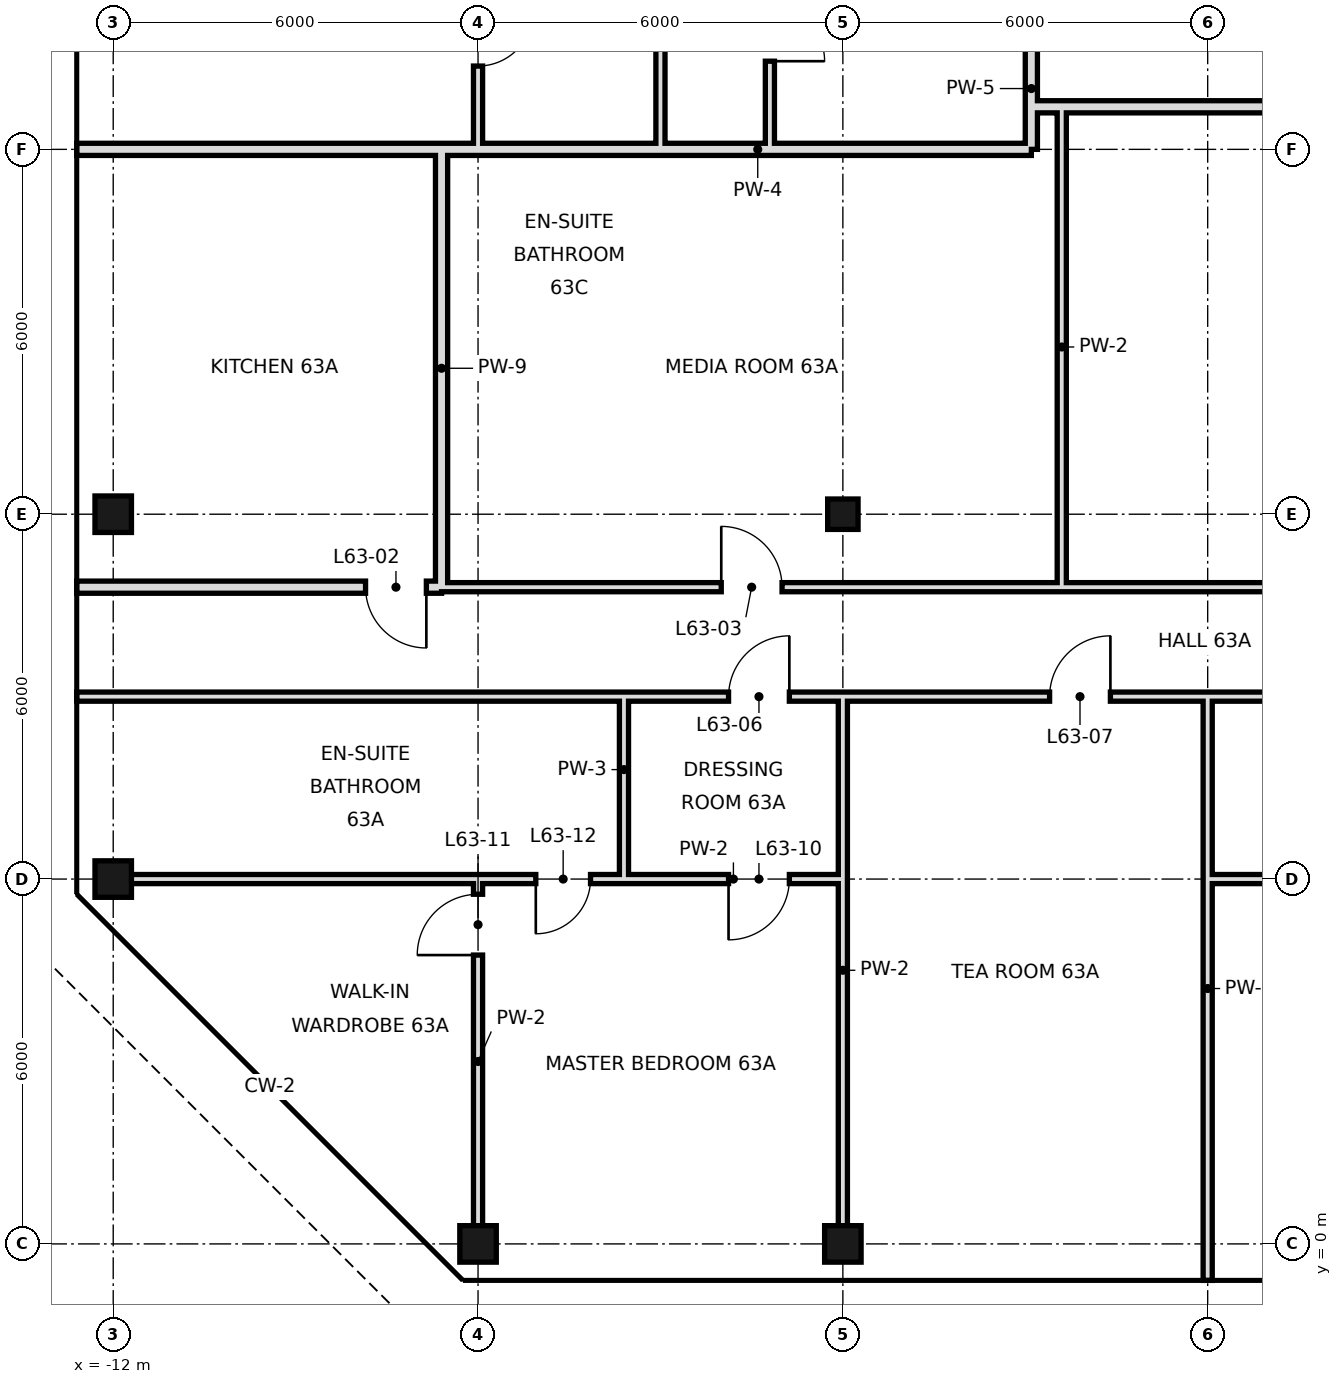
"""IFC4 building model, lengths in metres.
Left out: names, types, materials, properties, quantities, classifications, styles, units other than length and angle.
Written with IfcOpenShell. Run it as: python <this file> out.ifc"""

import sys

from ifc_helpers import new_model, si_unit, direction, frame, frame_2d, origin, origin_2d, place, context, subcontext, project, spatial, rectangle, hollow_rectangle, extrude, element, fill, save


model = new_model("IFC4")
c1 = context("Model", 3, precision=1e-05, world=origin(), true_north=direction((0.0, 1.0)))
c2 = subcontext(c1, "Body", "Model", "MODEL_VIEW")
j1 = project(units=[si_unit("LENGTHUNIT", "METRE"), si_unit("PLANEANGLEUNIT", "RADIAN")], contexts=[c1])
p1 = place(None, origin())
s1 = spatial("IfcSite", under=j1, at=p1, CompositionType="ELEMENT")
p2 = place(p1, origin())
s2 = spatial("IfcBuilding", under=s1, at=p2, CompositionType="ELEMENT")
p3 = place(p2, frame((0.0, 0.0, 266.6)))
s3 = spatial("IfcBuildingStorey", under=s2, at=p3, CompositionType="ELEMENT", Elevation=266.6)
for number, where, z_axis, x_axis in (
    (1, (-12.0, 6.0, 0.0), (0.0, 0.0, 1.0), (1.0, 0.0, 0.0)),
    (2, (-12.0, 12.0, 0.0), (0.0, 0.0, 1.0), (1.0, 0.0, 0.0)),
    (3, (-6.0, 0.0, 0.0), (0.0, 0.0, 1.0), (1.0, 0.0, 0.0)),
    (4, (0.0, 0.0, 0.0), (0.0, 0.0, 1.0), (1.0, 0.0, 0.0)),
):
    element("IfcColumn", number, at=place(p3, frame(where, z_axis=z_axis, x_axis=x_axis)), inside=s3, PredefinedType="COLUMN", context=c2, shape_type="SweptSolid", body=[
        extrude(hollow_rectangle(XDim=0.6, YDim=0.6, WallThickness=0.028, at=origin_2d()), origin(), (0.0, 0.0, 1.0), 3.6),
    ])
p4 = place(p3, frame((0.0, 12.0, 0.0), z_axis=(0.0, 0.0, 1.0), x_axis=(1.0, 0.0, 0.0)))
e5 = element("IfcColumn", 5, at=p4, inside=s3, PredefinedType="COLUMN", context=c2, shape_type="SweptSolid", body=[
    extrude(hollow_rectangle(XDim=0.5, YDim=0.5, WallThickness=0.025, at=origin_2d()), origin(), (0.0, 0.0, 1.0), 3.6),
])
p5 = place(p3, frame((-1.2, 18.0, 0.0), z_axis=(0.0, 0.0, 1.0), x_axis=(0.0, 1.0, 0.0)))
e6 = element("IfcWall", 6, at=p5, inside=s3, PredefinedType="PARTITIONING", context=c2, shape_type="SweptSolid", body=[
    extrude(rectangle(XDim=22.2, YDim=0.15, at=frame_2d((11.1, 0.0))), origin(), (0.0, 0.0, 1.0), 3.42),
])
p6 = place(p5, frame((6.64, 0.0, 0.0)))
e7 = element("IfcOpeningElement", 7, at=p6, cuts=e6, PredefinedType="OPENING", context=c2, shape_type="SweptSolid", body=[
    extrude(rectangle(XDim=1.0, YDim=2.4, at=frame_2d((0.5, 1.2))), frame((0.0, 0.085, 0.0), z_axis=(0.0, -1.0, 0.0), x_axis=(1.0, 0.0, 0.0)), (0.0, 0.0, 1.0), 0.17),
])
p7 = place(p5, frame((1.45, 0.0, 0.0)))
e8 = element("IfcOpeningElement", 8, at=p7, cuts=e6, PredefinedType="OPENING", context=c2, shape_type="SweptSolid", body=[
    extrude(rectangle(XDim=0.9, YDim=2.1, at=frame_2d((0.45, 1.05))), frame((0.0, 0.085, 0.0), z_axis=(0.0, -1.0, 0.0), x_axis=(1.0, 0.0, 0.0)), (0.0, 0.0, 1.0), 0.17),
])
p8 = place(p5, frame((15.7, 0.0, 0.0)))
e9 = element("IfcOpeningElement", 9, at=p8, cuts=e6, PredefinedType="OPENING", context=c2, shape_type="SweptSolid", body=[
    extrude(rectangle(XDim=1.0, YDim=2.4, at=frame_2d((0.5, 1.2))), frame((0.0, 0.085, 0.0), z_axis=(0.0, -1.0, 0.0), x_axis=(1.0, 0.0, 0.0)), (0.0, 0.0, 1.0), 0.17),
])
for number, where, z_axis, x_axis in (
    (10, (-3.0, 18.0, 0.0), (0.0, 0.0, 1.0), (0.0, 1.0, 0.0)),
    (11, (-3.6, 6.0, 0.0), (0.0, 0.0, 1.0), (0.0, 1.0, 0.0)),
):
    element("IfcWall", number, at=place(p3, frame(where, z_axis=z_axis, x_axis=x_axis)), inside=s3, PredefinedType="PARTITIONING", context=c2, shape_type="SweptSolid", body=[
        extrude(rectangle(XDim=3.0, YDim=0.15, at=frame_2d((1.5, 0.0))), origin(), (0.0, 0.0, 1.0), 3.42),
    ])
p9 = place(p3, frame((-6.0, 0.0, 0.0), z_axis=(0.0, 0.0, 1.0), x_axis=(0.0, 1.0, 0.0)))
e12 = element("IfcWall", 12, at=p9, inside=s3, PredefinedType="PARTITIONING", context=c2, shape_type="SweptSolid", body=[
    extrude(rectangle(XDim=6.0, YDim=0.15, at=frame_2d((3.0, 0.0))), origin(), (0.0, 0.0, 1.0), 3.42),
])
p10 = place(p9, frame((4.75, 0.0, 0.0)))
e13 = element("IfcOpeningElement", 13, at=p10, cuts=e12, PredefinedType="OPENING", context=c2, shape_type="SweptSolid", body=[
    extrude(rectangle(XDim=1.0, YDim=2.4, at=frame_2d((0.5, 1.2))), frame((0.0, 0.085, 0.0), z_axis=(0.0, -1.0, 0.0), x_axis=(1.0, 0.0, 0.0)), (0.0, 0.0, 1.0), 0.17),
])
p11 = place(p3, frame((-6.0, 18.0, 0.0), z_axis=(0.0, 0.0, 1.0), x_axis=(0.0, 1.0, 0.0)))
e14 = element("IfcWall", 14, at=p11, inside=s3, PredefinedType="PARTITIONING", context=c2, shape_type="SweptSolid", body=[
    extrude(rectangle(XDim=3.0, YDim=0.15, at=frame_2d((1.5, 0.0))), origin(), (0.0, 0.0, 1.0), 3.42),
])
p12 = place(p11, frame((1.37, 0.0, 0.0)))
e15 = element("IfcOpeningElement", 15, at=p12, cuts=e14, PredefinedType="OPENING", context=c2, shape_type="SweptSolid", body=[
    extrude(rectangle(XDim=0.9, YDim=2.4, at=frame_2d((0.45, 1.2))), frame((0.0, 0.085, 0.0), z_axis=(0.0, -1.0, 0.0), x_axis=(1.0, 0.0, 0.0)), (0.0, 0.0, 1.0), 0.17),
])
p13 = place(p3, frame((-6.6, 10.8, 0.0), z_axis=(0.0, 0.0, 1.0), x_axis=(0.0, 1.0, 0.0)))
e16 = element("IfcWall", 16, at=p13, inside=s3, PredefinedType="SOLIDWALL", context=c2, shape_type="SweptSolid", body=[
    extrude(rectangle(XDim=7.2, YDim=0.2, at=frame_2d((3.6, 0.0))), origin(), (0.0, 0.0, 1.0), 2.72),
])
p14 = place(p3, frame((0.0, 0.0, 0.0), z_axis=(0.0, 0.0, 1.0), x_axis=(0.0, 1.0, 0.0)))
e17 = element("IfcWall", 17, at=p14, inside=s3, PredefinedType="PARTITIONING", context=c2, shape_type="SweptSolid", body=[
    extrude(rectangle(XDim=9.0, YDim=0.15, at=frame_2d((4.5, 0.0))), origin(), (0.0, 0.0, 1.0), 2.72),
])
p15 = place(p3, frame((3.1, 18.7, 0.0), z_axis=(0.0, 0.0, 1.0), x_axis=(0.0, 1.0, 0.0)))
e18 = element("IfcWall", 18, at=p15, inside=s3, PredefinedType="SOLIDWALL", context=c2, shape_type="SweptSolid", body=[
    extrude(rectangle(XDim=21.5, YDim=0.2, at=frame_2d((10.75, 0.0))), origin(), (0.0, 0.0, 1.0), 2.97),
])
p16 = place(p15, frame((6.5, 0.0, 0.0)))
e19 = element("IfcOpeningElement", 19, at=p16, cuts=e18, PredefinedType="OPENING", context=c2, shape_type="SweptSolid", body=[
    extrude(rectangle(XDim=1.2, YDim=2.4, at=frame_2d((0.6, 1.2))), frame((0.0, 0.11, 0.0), z_axis=(0.0, -1.0, 0.0), x_axis=(1.0, 0.0, 0.0)), (0.0, 0.0, 1.0), 0.22),
])
p17 = place(p3, frame((3.1, 18.0, 0.0), z_axis=(0.0, 0.0, 1.0), x_axis=(0.0, 1.0, 0.0)))
e20 = element("IfcWall", 20, at=p17, inside=s3, PredefinedType="SOLIDWALL", context=c2, shape_type="SweptSolid", body=[
    extrude(rectangle(XDim=0.7, YDim=0.2, at=frame_2d((0.35, 0.0))), origin(), (0.0, 0.0, 1.0), 2.97),
])
p18 = place(p3, frame((3.6, 10.8, 0.0), z_axis=(0.0, 0.0, 1.0), x_axis=(0.0, 1.0, 0.0)))
e21 = element("IfcWall", 21, at=p18, inside=s3, PredefinedType="PARTITIONING", context=c2, shape_type="SweptSolid", body=[
    extrude(rectangle(XDim=7.9, YDim=0.15, at=frame_2d((3.95, 0.0))), origin(), (0.0, 0.0, 1.0), 3.42),
])
p19 = place(p3, frame((6.0, -0.6, 0.0), z_axis=(0.0, 0.0, 1.0), x_axis=(0.0, 1.0, 0.0)))
e22 = element("IfcWall", 22, at=p19, inside=s3, PredefinedType="PARTITIONING", context=c2, shape_type="SweptSolid", body=[
    extrude(rectangle(XDim=9.6, YDim=0.15, at=frame_2d((4.8, 0.0))), origin(), (0.0, 0.0, 1.0), 2.72),
])
p20 = place(p3, frame((-12.6, 10.8, 0.0), z_axis=(0.0, 0.0, 1.0), x_axis=(1.0, 0.0, 0.0)))
e23 = element("IfcWall", 23, at=p20, inside=s3, PredefinedType="SOLIDWALL", context=c2, shape_type="SweptSolid", body=[
    extrude(rectangle(XDim=6.0, YDim=0.2, at=frame_2d((3.0, 0.0))), origin(), (0.0, 0.0, 1.0), 2.97),
])
p21 = place(p20, frame((4.75, 0.0, 0.0)))
e24 = element("IfcOpeningElement", 24, at=p21, cuts=e23, PredefinedType="OPENING", context=c2, shape_type="SweptSolid", body=[
    extrude(rectangle(XDim=1.0, YDim=2.4, at=frame_2d((0.5, 1.2))), frame((0.0, 0.11, 0.0), z_axis=(0.0, -1.0, 0.0), x_axis=(1.0, 0.0, 0.0)), (0.0, 0.0, 1.0), 0.22),
])
p22 = place(p3, frame((-6.6, 10.8, 0.0), z_axis=(0.0, 0.0, 1.0), x_axis=(1.0, 0.0, 0.0)))
e25 = element("IfcWall", 25, at=p22, inside=s3, PredefinedType="PARTITIONING", context=c2, shape_type="SweptSolid", body=[
    extrude(rectangle(XDim=28.2, YDim=0.15, at=frame_2d((14.1, 0.0))), origin(), (0.0, 0.0, 1.0), 3.42),
])
p23 = place(p22, frame((25.6, 0.0, 0.0)))
e26 = element("IfcOpeningElement", 26, at=p23, cuts=e25, PredefinedType="OPENING", context=c2, shape_type="SweptSolid", body=[
    extrude(rectangle(XDim=1.0, YDim=2.4, at=frame_2d((0.5, 1.2))), frame((0.0, 0.085, 0.0), z_axis=(0.0, -1.0, 0.0), x_axis=(1.0, 0.0, 0.0)), (0.0, 0.0, 1.0), 0.17),
])
p24 = place(p22, frame((4.6, 0.0, 0.0)))
e27 = element("IfcOpeningElement", 27, at=p24, cuts=e25, PredefinedType="OPENING", context=c2, shape_type="SweptSolid", body=[
    extrude(rectangle(XDim=1.0, YDim=2.4, at=frame_2d((0.5, 1.2))), frame((0.0, 0.085, 0.0), z_axis=(0.0, -1.0, 0.0), x_axis=(1.0, 0.0, 0.0)), (0.0, 0.0, 1.0), 0.17),
])
p25 = place(p22, frame((15.7, 0.0, 0.0)))
e28 = element("IfcOpeningElement", 28, at=p25, cuts=e25, PredefinedType="OPENING", context=c2, shape_type="SweptSolid", body=[
    extrude(rectangle(XDim=1.0, YDim=2.4, at=frame_2d((0.5, 1.2))), frame((0.0, 0.085, 0.0), z_axis=(0.0, -1.0, 0.0), x_axis=(1.0, 0.0, 0.0)), (0.0, 0.0, 1.0), 0.17),
])
p26 = place(p3, frame((-12.6, 18.0, 0.0), z_axis=(0.0, 0.0, 1.0), x_axis=(1.0, 0.0, 0.0)))
e29 = element("IfcWall", 29, at=p26, inside=s3, PredefinedType="SOLIDWALL", context=c2, shape_type="SweptSolid", body=[
    extrude(rectangle(XDim=6.0, YDim=0.2, at=frame_2d((3.0, 0.0))), origin(), (0.0, 0.0, 1.0), 2.72),
])
p27 = place(p3, frame((-6.6, 18.0, 0.0), z_axis=(0.0, 0.0, 1.0), x_axis=(1.0, 0.0, 0.0)))
e30 = element("IfcWall", 30, at=p27, inside=s3, PredefinedType="SOLIDWALL", context=c2, shape_type="SweptSolid", body=[
    extrude(rectangle(XDim=9.7, YDim=0.2, at=frame_2d((4.85, 0.0))), origin(), (0.0, 0.0, 1.0), 2.72),
])
p28 = place(p3, frame((3.1, 18.7, 0.0), z_axis=(0.0, 0.0, 1.0), x_axis=(1.0, 0.0, 0.0)))
e31 = element("IfcWall", 31, at=p28, inside=s3, PredefinedType="SOLIDWALL", context=c2, shape_type="SweptSolid", body=[
    extrude(rectangle(XDim=20.9, YDim=0.2, at=frame_2d((10.45, 0.0))), origin(), (0.0, 0.0, 1.0), 2.72),
])
p29 = place(p28, frame((14.9, 0.0, 0.0)))
e32 = element("IfcOpeningElement", 32, at=p29, cuts=e31, PredefinedType="OPENING", context=c2, shape_type="SweptSolid", body=[
    extrude(rectangle(XDim=1.2, YDim=2.4, at=frame_2d((0.6, 1.2))), frame((0.0, 0.11, 0.0), z_axis=(0.0, -1.0, 0.0), x_axis=(1.0, 0.0, 0.0)), (0.0, 0.0, 1.0), 0.22),
])
p30 = place(p3, frame((-3.6, 6.0, 0.0), z_axis=(0.0, 0.0, 1.0), x_axis=(1.0, 0.0, 0.0)))
e33 = element("IfcWall", 33, at=p30, inside=s3, PredefinedType="PARTITIONING", context=c2, shape_type="SweptSolid", body=[
    extrude(rectangle(XDim=3.6, YDim=0.15, at=frame_2d((1.8, 0.0))), origin(), (0.0, 0.0, 1.0), 2.72),
])
p31 = place(p30, frame((1.72, 0.0, 0.0)))
e34 = element("IfcOpeningElement", 34, at=p31, cuts=e33, PredefinedType="OPENING", context=c2, shape_type="SweptSolid", body=[
    extrude(rectangle(XDim=1.0, YDim=2.4, at=frame_2d((0.5, 1.2))), frame((0.0, 0.085, 0.0), z_axis=(0.0, -1.0, 0.0), x_axis=(1.0, 0.0, 0.0)), (0.0, 0.0, 1.0), 0.17),
])
p32 = place(p3, frame((6.0, 6.0, 0.0), z_axis=(0.0, 0.0, 1.0), x_axis=(1.0, 0.0, 0.0)))
e35 = element("IfcWall", 35, at=p32, inside=s3, PredefinedType="PARTITIONING", context=c2, shape_type="SweptSolid", body=[
    extrude(rectangle(XDim=15.6, YDim=0.15, at=frame_2d((7.8, 0.0))), origin(), (0.0, 0.0, 1.0), 2.97),
])
p33 = place(p32, frame((7.04, 0.0, 0.0)))
e36 = element("IfcOpeningElement", 36, at=p33, cuts=e35, PredefinedType="OPENING", context=c2, shape_type="SweptSolid", body=[
    extrude(rectangle(XDim=1.8, YDim=2.4, at=frame_2d((0.9, 1.2))), frame((0.0, 0.085, 0.0), z_axis=(0.0, -1.0, 0.0), x_axis=(1.0, 0.0, 0.0)), (0.0, 0.0, 1.0), 0.17),
])
p34 = place(p32, frame((12.88, 0.0, 0.0)))
e37 = element("IfcOpeningElement", 37, at=p34, cuts=e35, PredefinedType="OPENING", context=c2, shape_type="SweptSolid", body=[
    extrude(rectangle(XDim=1.0, YDim=2.4, at=frame_2d((0.5, 1.2))), frame((0.0, 0.085, 0.0), z_axis=(0.0, -1.0, 0.0), x_axis=(1.0, 0.0, 0.0)), (0.0, 0.0, 1.0), 0.17),
])
p35 = place(p3, frame((-12.0, 6.0, 0.0), z_axis=(0.0, 0.0, 1.0), x_axis=(1.0, 0.0, 0.0)))
e38 = element("IfcWall", 38, at=p35, inside=s3, PredefinedType="PARTITIONING", context=c2, shape_type="SweptSolid", body=[
    extrude(rectangle(XDim=8.4, YDim=0.15, at=frame_2d((4.2, 0.0))), origin(), (0.0, 0.0, 1.0), 2.72),
])
p36 = place(p35, frame((6.95, 0.0, 0.0)))
e39 = element("IfcOpeningElement", 39, at=p36, cuts=e38, PredefinedType="OPENING", context=c2, shape_type="SweptSolid", body=[
    extrude(rectangle(XDim=0.9, YDim=2.4, at=frame_2d((0.45, 1.2))), frame((0.0, 0.085, 0.0), z_axis=(0.0, -1.0, 0.0), x_axis=(1.0, 0.0, 0.0)), (0.0, 0.0, 1.0), 0.17),
])
p37 = place(p3, frame((-3.6, 9.0, 0.0), z_axis=(0.0, 0.0, 1.0), x_axis=(1.0, 0.0, 0.0)))
e40 = element("IfcWall", 40, at=p37, inside=s3, PredefinedType="PARTITIONING", context=c2, shape_type="SweptSolid", body=[
    extrude(rectangle(XDim=25.2, YDim=0.15, at=frame_2d((12.6, 0.0))), origin(), (0.0, 0.0, 1.0), 3.42),
])
p38 = place(p37, frame((1.72, 0.0, 0.0)))
e41 = element("IfcOpeningElement", 41, at=p38, cuts=e40, PredefinedType="OPENING", context=c2, shape_type="SweptSolid", body=[
    extrude(rectangle(XDim=1.0, YDim=2.4, at=frame_2d((0.5, 1.2))), frame((0.0, 0.085, 0.0), z_axis=(0.0, -1.0, 0.0), x_axis=(1.0, 0.0, 0.0)), (0.0, 0.0, 1.0), 0.17),
])
p39 = place(p37, frame((7.0, 0.0, 0.0)))
e42 = element("IfcOpeningElement", 42, at=p39, cuts=e40, PredefinedType="OPENING", context=c2, shape_type="SweptSolid", body=[
    extrude(rectangle(XDim=1.0, YDim=2.4, at=frame_2d((0.5, 1.2))), frame((0.0, 0.085, 0.0), z_axis=(0.0, -1.0, 0.0), x_axis=(1.0, 0.0, 0.0)), (0.0, 0.0, 1.0), 0.17),
])
p40 = place(p37, frame((12.76, 0.0, 0.0)))
e43 = element("IfcOpeningElement", 43, at=p40, cuts=e40, PredefinedType="OPENING", context=c2, shape_type="SweptSolid", body=[
    extrude(rectangle(XDim=1.8, YDim=2.4, at=frame_2d((0.9, 1.2))), frame((0.0, 0.085, 0.0), z_axis=(0.0, -1.0, 0.0), x_axis=(1.0, 0.0, 0.0)), (0.0, 0.0, 1.0), 0.17),
])
p41 = place(p37, frame((22.48, 0.0, 0.0)))
e44 = element("IfcOpeningElement", 44, at=p41, cuts=e40, PredefinedType="OPENING", context=c2, shape_type="SweptSolid", body=[
    extrude(rectangle(XDim=1.0, YDim=2.4, at=frame_2d((0.5, 1.2))), frame((0.0, 0.085, 0.0), z_axis=(0.0, -1.0, 0.0), x_axis=(1.0, 0.0, 0.0)), (0.0, 0.0, 1.0), 0.17),
])
p42 = place(p3, frame((-12.6, 9.0, 0.0), z_axis=(0.0, 0.0, 1.0), x_axis=(1.0, 0.0, 0.0)))
e45 = element("IfcWall", 45, at=p42, inside=s3, PredefinedType="PARTITIONING", context=c2, shape_type="SweptSolid", body=[
    extrude(rectangle(XDim=9.0, YDim=0.15, at=frame_2d((4.5, 0.0))), origin(), (0.0, 0.0, 1.0), 3.42),
])
p43 = place(p21, origin())
e46 = element("IfcDoor", 46, at=p43, inside=s3, OperationType="SINGLE_SWING_RIGHT", PredefinedType="DOOR", context=c2, shape_type="SweptSolid", body=[
    extrude(rectangle(XDim=1.0, YDim=2.4, at=frame_2d((0.5, 1.2))), frame((0.0, 0.025, 0.0), z_axis=(0.0, -1.0, 0.0), x_axis=(1.0, 0.0, 0.0)), (0.0, 0.0, 1.0), 0.05),
])
fill(e24, e46)
p44 = place(p24, origin())
e47 = element("IfcDoor", 47, at=p44, inside=s3, OperationType="SINGLE_SWING_LEFT", PredefinedType="DOOR", context=c2, shape_type="SweptSolid", body=[
    extrude(rectangle(XDim=1.0, YDim=2.4, at=frame_2d((0.5, 1.2))), frame((0.0, 0.025, 0.0), z_axis=(0.0, -1.0, 0.0), x_axis=(1.0, 0.0, 0.0)), (0.0, 0.0, 1.0), 0.05),
])
fill(e27, e47)
p45 = place(p38, frame((1.0, 0.0, 0.0), z_axis=(0.0, 0.0, 1.0), x_axis=(-1.0, 0.0, 0.0)))
e48 = element("IfcDoor", 48, at=p45, inside=s3, OperationType="SINGLE_SWING_LEFT", PredefinedType="DOOR", context=c2, shape_type="SweptSolid", body=[
    extrude(rectangle(XDim=1.0, YDim=2.4, at=frame_2d((0.5, 1.2))), frame((0.0, 0.025, 0.0), z_axis=(0.0, -1.0, 0.0), x_axis=(1.0, 0.0, 0.0)), (0.0, 0.0, 1.0), 0.05),
])
fill(e41, e48)
p46 = place(p39, frame((1.0, 0.0, 0.0), z_axis=(0.0, 0.0, 1.0), x_axis=(-1.0, 0.0, 0.0)))
e49 = element("IfcDoor", 49, at=p46, inside=s3, OperationType="SINGLE_SWING_LEFT", PredefinedType="DOOR", context=c2, shape_type="SweptSolid", body=[
    extrude(rectangle(XDim=1.0, YDim=2.4, at=frame_2d((0.5, 1.2))), frame((0.0, 0.025, 0.0), z_axis=(0.0, -1.0, 0.0), x_axis=(1.0, 0.0, 0.0)), (0.0, 0.0, 1.0), 0.05),
])
fill(e42, e49)
p47 = place(p31, frame((1.0, 0.0, 0.0), z_axis=(0.0, 0.0, 1.0), x_axis=(-1.0, 0.0, 0.0)))
e50 = element("IfcDoor", 50, at=p47, inside=s3, OperationType="SINGLE_SWING_RIGHT", PredefinedType="DOOR", context=c2, shape_type="SweptSolid", body=[
    extrude(rectangle(XDim=1.0, YDim=2.4, at=frame_2d((0.5, 1.2))), frame((0.0, 0.025, 0.0), z_axis=(0.0, -1.0, 0.0), x_axis=(1.0, 0.0, 0.0)), (0.0, 0.0, 1.0), 0.05),
])
fill(e34, e50)
p48 = place(p10, origin())
e51 = element("IfcDoor", 51, at=p48, inside=s3, OperationType="SINGLE_SWING_LEFT", PredefinedType="DOOR", context=c2, shape_type="SweptSolid", body=[
    extrude(rectangle(XDim=1.0, YDim=2.4, at=frame_2d((0.5, 1.2))), frame((0.0, 0.025, 0.0), z_axis=(0.0, -1.0, 0.0), x_axis=(1.0, 0.0, 0.0)), (0.0, 0.0, 1.0), 0.05),
])
fill(e13, e51)
p49 = place(p36, frame((0.9, 0.0, 0.0), z_axis=(0.0, 0.0, 1.0), x_axis=(-1.0, 0.0, 0.0)))
e52 = element("IfcDoor", 52, at=p49, inside=s3, OperationType="SINGLE_SWING_RIGHT", PredefinedType="DOOR", context=c2, shape_type="SweptSolid", body=[
    extrude(rectangle(XDim=0.9, YDim=2.4, at=frame_2d((0.45, 1.2))), frame((0.0, 0.025, 0.0), z_axis=(0.0, -1.0, 0.0), x_axis=(1.0, 0.0, 0.0)), (0.0, 0.0, 1.0), 0.05),
])
fill(e39, e52)
p50 = place(p7, frame((0.9, 0.0, 0.0), z_axis=(0.0, 0.0, 1.0), x_axis=(-1.0, 0.0, 0.0)))
e53 = element("IfcDoor", 53, at=p50, inside=s3, OperationType="SINGLE_SWING_RIGHT", PredefinedType="DOOR", context=c2, shape_type="SweptSolid", body=[
    extrude(rectangle(XDim=0.9, YDim=2.1, at=frame_2d((0.45, 1.05))), frame((0.0, 0.025, 0.0), z_axis=(0.0, -1.0, 0.0), x_axis=(1.0, 0.0, 0.0)), (0.0, 0.0, 1.0), 0.05),
])
fill(e8, e53)
p51 = place(p12, origin())
e54 = element("IfcDoor", 54, at=p51, inside=s3, OperationType="SINGLE_SWING_RIGHT", PredefinedType="DOOR", context=c2, shape_type="SweptSolid", body=[
    extrude(rectangle(XDim=0.9, YDim=2.4, at=frame_2d((0.45, 1.2))), frame((0.0, 0.025, 0.0), z_axis=(0.0, -1.0, 0.0), x_axis=(1.0, 0.0, 0.0)), (0.0, 0.0, 1.0), 0.05),
])
fill(e15, e54)
save(model, sys.argv[1])
